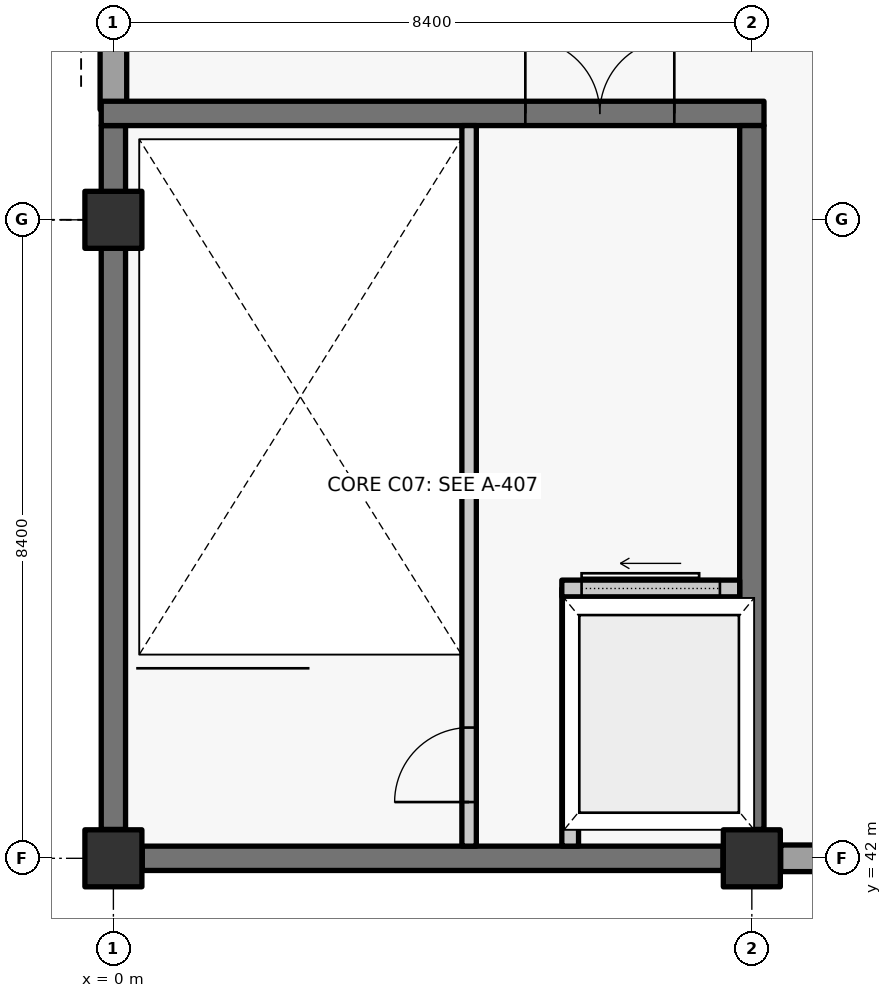
"""IFC4 building model, lengths in metres.
Left out: names, types, materials, properties, quantities, classifications, styles, units other than length and angle.
Written with IfcOpenShell. Run it as: python <this file> out.ifc"""

import sys

from ifc_helpers import new_model, si_unit, direction, frame, frame_2d, origin, origin_2d, place, context, subcontext, project, spatial, rectangle, extrude, element, fill, save


model = new_model("IFC4")
c1 = context("Model", 3, precision=1e-05, world=origin(), true_north=direction((0.0, 1.0)))
c2 = subcontext(c1, "Body", "Model", "MODEL_VIEW")
j1 = project(units=[si_unit("LENGTHUNIT", "METRE"), si_unit("PLANEANGLEUNIT", "RADIAN")], contexts=[c1])
p1 = place(None, origin())
s1 = spatial("IfcSite", under=j1, at=p1, CompositionType="ELEMENT")
p2 = place(p1, origin())
s2 = spatial("IfcBuilding", under=s1, at=p2, CompositionType="ELEMENT")
p3 = place(p2, frame((0.0, 0.0, 11.4)))
s3 = spatial("IfcBuildingStorey", under=s2, at=p3, CompositionType="ELEMENT", Elevation=11.4)
for number, where, z_axis, x_axis in (
    (1, (0.0, 42.0, 0.0), (0.0, 0.0, 1.0), (1.0, 0.0, 0.0)),
    (2, (0.0, 50.4, 0.0), (0.0, 0.0, 1.0), (1.0, 0.0, 0.0)),
    (3, (8.4, 42.0, 0.0), (0.0, 0.0, 1.0), (1.0, 0.0, 0.0)),
):
    element("IfcColumn", number, at=place(p3, frame(where, z_axis=z_axis, x_axis=x_axis)), inside=s3, PredefinedType="COLUMN", context=c2, shape_type="SweptSolid", body=[
        extrude(rectangle(XDim=0.75, YDim=0.75, at=origin_2d()), origin(), (0.0, 0.0, 1.0), 4.8),
    ])
p4 = place(p3, frame((0.0, 51.85, 0.0), z_axis=(0.0, 0.0, 1.0), x_axis=(0.0, 1.0, 0.0)))
e4 = element("IfcWall", 4, at=p4, inside=s3, PredefinedType="SOLIDWALL", context=c2, shape_type="SweptSolid", body=[
    extrude(rectangle(XDim=6.57, YDim=0.35, at=frame_2d((3.285, 0.0))), origin(), (0.0, 0.0, 1.0), 4.52),
])
p5 = place(p4, frame((1.635, 0.0, 1.35)))
e5 = element("IfcOpeningElement", 5, at=p5, cuts=e4, PredefinedType="OPENING", context=c2, shape_type="SweptSolid", body=[
    extrude(rectangle(XDim=3.2, YDim=1.3, at=frame_2d((1.6, 0.65))), frame((0.0, 0.185, 0.0), z_axis=(0.0, -1.0, 0.0), x_axis=(1.0, 0.0, 0.0)), (0.0, 0.0, 1.0), 0.37),
])
p6 = place(p3, frame((16.42, 42.0, 0.0), z_axis=(0.0, 0.0, 1.0), x_axis=(-1.0, 0.0, 0.0)))
e6 = element("IfcWall", 6, at=p6, inside=s3, PredefinedType="SOLIDWALL", context=c2, shape_type="SweptSolid", body=[
    extrude(rectangle(XDim=7.64, YDim=0.35, at=frame_2d((3.82, 0.0))), origin(), (0.0, 0.0, 1.0), 4.52),
])
p7 = place(p6, frame((3.22, 0.0, 1.1)))
e7 = element("IfcOpeningElement", 7, at=p7, cuts=e6, PredefinedType="OPENING", context=c2, shape_type="SweptSolid", body=[
    extrude(rectangle(XDim=1.2, YDim=1.8, at=frame_2d((0.6, 0.9))), frame((0.0, 0.185, 0.0), z_axis=(0.0, -1.0, 0.0), x_axis=(1.0, 0.0, 0.0)), (0.0, 0.0, 1.0), 0.37),
])
p8 = place(p3, frame((8.02, 42.0, 0.0), z_axis=(0.0, 0.0, 1.0), x_axis=(-1.0, 0.0, 0.0)))
e8 = element("IfcWall", 8, at=p8, inside=s3, PredefinedType="SHEAR", context=c2, shape_type="SweptSolid", body=[
    extrude(rectangle(XDim=7.64, YDim=0.32, at=frame_2d((3.82, 0.0))), origin(), (0.0, 0.0, 1.0), 4.52),
])
p9 = place(p3, frame((0.0, 42.38, 0.0), z_axis=(0.0, 0.0, 1.0), x_axis=(0.0, 1.0, 0.0)))
e9 = element("IfcWall", 9, at=p9, inside=s3, PredefinedType="SHEAR", context=c2, shape_type="SweptSolid", body=[
    extrude(rectangle(XDim=9.26, YDim=0.32, at=frame_2d((4.63, 0.0))), origin(), (0.0, 0.0, 1.0), 4.52),
])
p10 = place(p3, frame((-0.16, 51.8, 0.0), z_axis=(0.0, 0.0, 1.0), x_axis=(1.0, 0.0, 0.0)))
e10 = element("IfcWall", 10, at=p10, inside=s3, PredefinedType="SHEAR", context=c2, shape_type="SweptSolid", body=[
    extrude(rectangle(XDim=8.72, YDim=0.32, at=frame_2d((4.36, 0.0))), origin(), (0.0, 0.0, 1.0), 4.52),
])
p11 = place(p10, frame((5.58, 0.0, 0.0)))
e11 = element("IfcOpeningElement", 11, at=p11, cuts=e10, PredefinedType="OPENING", context=c2, shape_type="SweptSolid", body=[
    extrude(rectangle(XDim=1.96, YDim=2.2, at=frame_2d((0.98, 1.1))), frame((0.0, 0.17, 0.0), z_axis=(0.0, -1.0, 0.0), x_axis=(1.0, 0.0, 0.0)), (0.0, 0.0, 1.0), 0.34),
])
p12 = place(p3, frame((8.4, 51.64, 0.0), z_axis=(0.0, 0.0, 1.0), x_axis=(0.0, -1.0, 0.0)))
e12 = element("IfcWall", 12, at=p12, inside=s3, PredefinedType="SHEAR", context=c2, shape_type="SweptSolid", body=[
    extrude(rectangle(XDim=9.26, YDim=0.32, at=frame_2d((4.63, 0.0))), origin(), (0.0, 0.0, 1.0), 4.52),
])
p13 = place(p3, frame((4.68, 42.16, 0.0), z_axis=(0.0, 0.0, 1.0), x_axis=(0.0, 1.0, 0.0)))
e13 = element("IfcWall", 13, at=p13, inside=s3, PredefinedType="SOLIDWALL", context=c2, shape_type="SweptSolid", body=[
    extrude(rectangle(XDim=9.48, YDim=0.19, at=frame_2d((4.74, 0.0))), origin(), (0.0, 0.0, 1.0), 4.52),
])
p14 = place(p13, frame((0.58, 0.0, 0.0)))
e14 = element("IfcOpeningElement", 14, at=p14, cuts=e13, PredefinedType="OPENING", context=c2, shape_type="SweptSolid", body=[
    extrude(rectangle(XDim=0.98, YDim=2.15, at=frame_2d((0.49, 1.075))), frame((0.0, 0.105, 0.0), z_axis=(0.0, -1.0, 0.0), x_axis=(1.0, 0.0, 0.0)), (0.0, 0.0, 1.0), 0.21),
])
p15 = place(p3, frame((6.01, 42.16, 0.0), z_axis=(0.0, 0.0, 1.0), x_axis=(0.0, 1.0, 0.0)))
e15 = element("IfcWall", 15, at=p15, inside=s3, PredefinedType="SOLIDWALL", context=c2, shape_type="SweptSolid", body=[
    extrude(rectangle(XDim=3.39, YDim=0.22, at=frame_2d((1.695, 0.0))), origin(), (0.0, 0.0, 1.0), 4.52),
])
p16 = place(p3, frame((5.9, 45.55, 0.0), z_axis=(0.0, 0.0, 1.0), x_axis=(1.0, 0.0, 0.0)))
e16 = element("IfcWall", 16, at=p16, inside=s3, PredefinedType="SOLIDWALL", context=c2, shape_type="SweptSolid", body=[
    extrude(rectangle(XDim=2.34, YDim=0.22, at=frame_2d((1.17, 0.0))), origin(), (0.0, 0.0, 1.0), 4.52),
])
p17 = place(p16, frame((0.26, 0.0, 0.0)))
e17 = element("IfcOpeningElement", 17, at=p17, cuts=e16, PredefinedType="OPENING", context=c2, shape_type="SweptSolid", body=[
    extrude(rectangle(XDim=1.82, YDim=2.4, at=frame_2d((0.91, 1.2))), frame((0.0, 0.12, 0.0), z_axis=(0.0, -1.0, 0.0), x_axis=(1.0, 0.0, 0.0)), (0.0, 0.0, 1.0), 0.24),
])
p18 = place(p14, origin())
e18 = element("IfcDoor", 18, at=p18, inside=s3, OperationType="SINGLE_SWING_LEFT", PredefinedType="DOOR", context=c2, shape_type="SweptSolid", body=[
    extrude(rectangle(XDim=0.98, YDim=2.15, at=frame_2d((0.49, 1.075))), frame((0.0, 0.025, 0.0), z_axis=(0.0, -1.0, 0.0), x_axis=(1.0, 0.0, 0.0)), (0.0, 0.0, 1.0), 0.05),
])
fill(e14, e18)
p19 = place(p11, origin())
e19 = element("IfcDoor", 19, at=p19, inside=s3, OperationType="DOUBLE_DOOR_SINGLE_SWING", PredefinedType="DOOR", context=c2, shape_type="SweptSolid", body=[
    extrude(rectangle(XDim=1.96, YDim=2.2, at=frame_2d((0.98, 1.1))), frame((0.0, 0.025, 0.0), z_axis=(0.0, -1.0, 0.0), x_axis=(1.0, 0.0, 0.0)), (0.0, 0.0, 1.0), 0.05),
])
fill(e11, e19)
p20 = place(p17, origin())
e20 = element("IfcDoor", 20, at=p20, inside=s3, OperationType="SLIDING_TO_LEFT", PredefinedType="DOOR", context=c2, shape_type="SweptSolid", body=[
    extrude(rectangle(XDim=1.82, YDim=2.4, at=frame_2d((0.91, 1.2))), frame((0.0, 0.025, 0.0), z_axis=(0.0, -1.0, 0.0), x_axis=(1.0, 0.0, 0.0)), (0.0, 0.0, 1.0), 0.05),
])
fill(e17, e20)
save(model, sys.argv[1])
